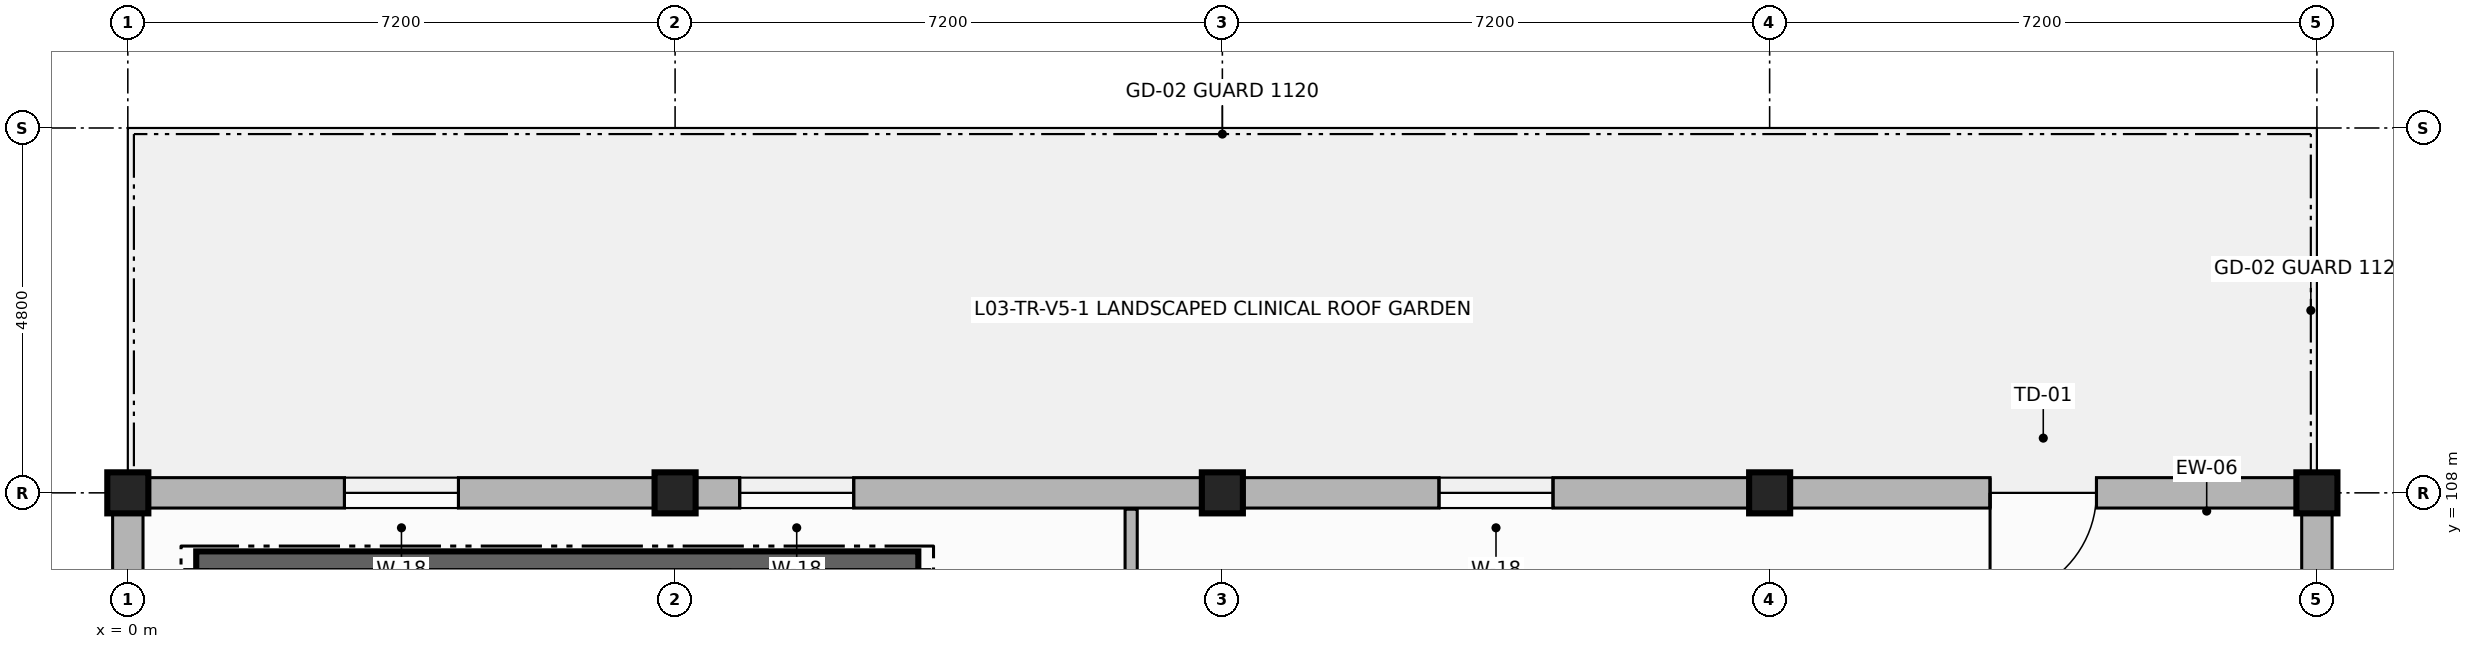
"""IFC4 building model, lengths in metres.
Left out: names, types, materials, properties, quantities, classifications, styles, units other than length and angle.
Written with IfcOpenShell. Run it as: python <this file> out.ifc"""

import sys

from ifc_helpers import new_model, si_unit, direction, frame, frame_2d, origin, origin_2d, place, context, subcontext, project, spatial, rectangle, extrude, element, fill, save


model = new_model("IFC4")
c1 = context("Model", 3, precision=1e-05, world=origin(), true_north=direction((0.0, 1.0)))
c2 = subcontext(c1, "Body", "Model", "MODEL_VIEW")
j1 = project(units=[si_unit("LENGTHUNIT", "METRE"), si_unit("PLANEANGLEUNIT", "RADIAN")], contexts=[c1])
p1 = place(None, origin())
s1 = spatial("IfcSite", under=j1, at=p1, CompositionType="ELEMENT")
p2 = place(p1, origin())
s2 = spatial("IfcBuilding", under=s1, at=p2, CompositionType="ELEMENT")
p3 = place(p2, frame((0.0, 0.0, 12.3)))
s3 = spatial("IfcBuildingStorey", under=s2, at=p3, CompositionType="ELEMENT", Elevation=12.3)
for number, where, z_axis, x_axis in (
    (1, (0.0, 108.0, 0.0), (0.0, 0.0, 1.0), (1.0, 0.0, 0.0)),
    (2, (7.2, 108.0, 0.0), (0.0, 0.0, 1.0), (1.0, 0.0, 0.0)),
    (3, (14.4, 108.0, 0.0), (0.0, 0.0, 1.0), (1.0, 0.0, 0.0)),
    (4, (21.6, 108.0, 0.0), (0.0, 0.0, 1.0), (1.0, 0.0, 0.0)),
    (5, (28.8, 108.0, 0.0), (0.0, 0.0, 1.0), (1.0, 0.0, 0.0)),
):
    element("IfcColumn", number, at=place(p3, frame(where, z_axis=z_axis, x_axis=x_axis)), inside=s3, PredefinedType="COLUMN", context=c2, shape_type="SweptSolid", body=[
        extrude(rectangle(XDim=0.54, YDim=0.54, at=origin_2d()), origin(), (0.0, 0.0, 1.0), 3.39),
    ])
p4 = place(p3, frame((28.8, 100.8, 0.0), z_axis=(0.0, 0.0, 1.0), x_axis=(0.0, 1.0, 0.0)))
e6 = element("IfcWall", 6, at=p4, inside=s3, PredefinedType="SOLIDWALL", context=c2, shape_type="SweptSolid", body=[
    extrude(rectangle(XDim=7.2, YDim=0.4, at=frame_2d((3.6, 0.0))), origin(), (0.0, 0.0, 1.0), 2.72),
])
p5 = place(p4, frame((2.85, 0.0, 0.9)))
e7 = element("IfcOpeningElement", 7, at=p5, cuts=e6, PredefinedType="OPENING", context=c2, shape_type="SweptSolid", body=[
    extrude(rectangle(XDim=1.5, YDim=1.6, at=frame_2d((0.75, 0.8))), frame((0.0, 0.21, 0.0), z_axis=(0.0, -1.0, 0.0), x_axis=(1.0, 0.0, 0.0)), (0.0, 0.0, 1.0), 0.42),
])
p6 = place(p3, frame((28.8, 108.0, 0.0), z_axis=(0.0, 0.0, 1.0), x_axis=(-1.0, 0.0, 0.0)))
e8 = element("IfcWall", 8, at=p6, inside=s3, PredefinedType="SOLIDWALL", context=c2, shape_type="SweptSolid", body=[
    extrude(rectangle(XDim=7.2, YDim=0.4, at=frame_2d((3.6, 0.0))), origin(), (0.0, 0.0, 1.0), 2.72),
])
p7 = place(p6, frame((2.9, 0.0, 0.0)))
e9 = element("IfcOpeningElement", 9, at=p7, cuts=e8, PredefinedType="OPENING", context=c2, shape_type="SweptSolid", body=[
    extrude(rectangle(XDim=1.4, YDim=2.25, at=frame_2d((0.7, 1.125))), frame((0.0, 0.21, 0.0), z_axis=(0.0, -1.0, 0.0), x_axis=(1.0, 0.0, 0.0)), (0.0, 0.0, 1.0), 0.42),
])
p8 = place(p3, frame((21.6, 108.0, 0.0), z_axis=(0.0, 0.0, 1.0), x_axis=(-1.0, 0.0, 0.0)))
e10 = element("IfcWall", 10, at=p8, inside=s3, PredefinedType="SOLIDWALL", context=c2, shape_type="SweptSolid", body=[
    extrude(rectangle(XDim=7.2, YDim=0.4, at=frame_2d((3.6, 0.0))), origin(), (0.0, 0.0, 1.0), 2.72),
])
p9 = place(p8, frame((2.85, 0.0, 0.9)))
e11 = element("IfcOpeningElement", 11, at=p9, cuts=e10, PredefinedType="OPENING", context=c2, shape_type="SweptSolid", body=[
    extrude(rectangle(XDim=1.5, YDim=1.6, at=frame_2d((0.75, 0.8))), frame((0.0, 0.21, 0.0), z_axis=(0.0, -1.0, 0.0), x_axis=(1.0, 0.0, 0.0)), (0.0, 0.0, 1.0), 0.42),
])
p10 = place(p3, frame((14.4, 108.0, 0.0), z_axis=(0.0, 0.0, 1.0), x_axis=(-1.0, 0.0, 0.0)))
e12 = element("IfcWall", 12, at=p10, inside=s3, PredefinedType="SOLIDWALL", context=c2, shape_type="SweptSolid", body=[
    extrude(rectangle(XDim=7.2, YDim=0.4, at=frame_2d((3.6, 0.0))), origin(), (0.0, 0.0, 1.0), 2.72),
])
p11 = place(p10, frame((4.85, 0.0, 0.9)))
e13 = element("IfcOpeningElement", 13, at=p11, cuts=e12, PredefinedType="OPENING", context=c2, shape_type="SweptSolid", body=[
    extrude(rectangle(XDim=1.5, YDim=1.6, at=frame_2d((0.75, 0.8))), frame((0.0, 0.21, 0.0), z_axis=(0.0, -1.0, 0.0), x_axis=(1.0, 0.0, 0.0)), (0.0, 0.0, 1.0), 0.42),
])
p12 = place(p3, frame((7.2, 108.0, 0.0), z_axis=(0.0, 0.0, 1.0), x_axis=(-1.0, 0.0, 0.0)))
e14 = element("IfcWall", 14, at=p12, inside=s3, PredefinedType="SOLIDWALL", context=c2, shape_type="SweptSolid", body=[
    extrude(rectangle(XDim=7.2, YDim=0.4, at=frame_2d((3.6, 0.0))), origin(), (0.0, 0.0, 1.0), 2.72),
])
p13 = place(p12, frame((2.85, 0.0, 0.9)))
e15 = element("IfcOpeningElement", 15, at=p13, cuts=e14, PredefinedType="OPENING", context=c2, shape_type="SweptSolid", body=[
    extrude(rectangle(XDim=1.5, YDim=1.6, at=frame_2d((0.75, 0.8))), frame((0.0, 0.21, 0.0), z_axis=(0.0, -1.0, 0.0), x_axis=(1.0, 0.0, 0.0)), (0.0, 0.0, 1.0), 0.42),
])
p14 = place(p3, frame((0.0, 108.0, 0.0), z_axis=(0.0, 0.0, 1.0), x_axis=(0.0, -1.0, 0.0)))
e16 = element("IfcWall", 16, at=p14, inside=s3, PredefinedType="SOLIDWALL", context=c2, shape_type="SweptSolid", body=[
    extrude(rectangle(XDim=7.2, YDim=0.4, at=frame_2d((3.6, 0.0))), origin(), (0.0, 0.0, 1.0), 2.72),
])
p15 = place(p14, frame((2.6, 0.0, 0.9)))
e17 = element("IfcOpeningElement", 17, at=p15, cuts=e16, PredefinedType="OPENING", context=c2, shape_type="SweptSolid", body=[
    extrude(rectangle(XDim=1.5, YDim=1.6, at=frame_2d((0.75, 0.8))), frame((0.0, 0.21, 0.0), z_axis=(0.0, -1.0, 0.0), x_axis=(1.0, 0.0, 0.0)), (0.0, 0.0, 1.0), 0.42),
])
p16 = place(p3, frame((10.4, 107.1, 0.0), z_axis=(0.0, 0.0, 1.0), x_axis=(-1.0, 0.0, 0.0)))
e18 = element("IfcWall", 18, at=p16, inside=s3, PredefinedType="SHEAR", context=c2, shape_type="SweptSolid", body=[
    extrude(rectangle(XDim=9.5, YDim=0.26, at=frame_2d((4.75, 0.0))), origin(), (0.0, 0.0, 1.0), 3.39),
])
p17 = place(p3, frame((13.2, 105.479, 0.0), z_axis=(0.0, 0.0, 1.0), x_axis=(0.0, 1.0, 0.0)))
e19 = element("IfcWall", 19, at=p17, inside=s3, PredefinedType="PARTITIONING", context=c2, shape_type="SweptSolid", body=[
    extrude(rectangle(XDim=2.306, YDim=0.16, at=frame_2d((1.153, 0.0))), origin(), (0.0, 0.0, 1.0), 2.7),
])
p18 = place(p17, frame((0.48, 0.0, 0.0)))
e20 = element("IfcOpeningElement", 20, at=p18, cuts=e19, PredefinedType="OPENING", context=c2, shape_type="SweptSolid", body=[
    extrude(rectangle(XDim=0.98, YDim=2.15, at=frame_2d((0.49, 1.075))), frame((0.0, 0.09, 0.0), z_axis=(0.0, -1.0, 0.0), x_axis=(1.0, 0.0, 0.0)), (0.0, 0.0, 1.0), 0.18),
])
p19 = place(p7, origin())
e21 = element("IfcDoor", 21, at=p19, inside=s3, OperationType="SINGLE_SWING_RIGHT", PredefinedType="DOOR", context=c2, shape_type="SweptSolid", body=[
    extrude(rectangle(XDim=1.4, YDim=2.25, at=frame_2d((0.7, 1.125))), frame((0.0, 0.025, 0.0), z_axis=(0.0, -1.0, 0.0), x_axis=(1.0, 0.0, 0.0)), (0.0, 0.0, 1.0), 0.05),
])
fill(e9, e21)
p20 = place(p9, origin())
e22 = element("IfcWindow", 22, at=p20, inside=s3, PartitioningType="SINGLE_PANEL", PredefinedType="WINDOW", context=c2, shape_type="SweptSolid", body=[
    extrude(rectangle(XDim=1.5, YDim=1.6, at=frame_2d((0.75, 0.8))), frame((0.0, 0.03, 0.0), z_axis=(0.0, -1.0, 0.0), x_axis=(1.0, 0.0, 0.0)), (0.0, 0.0, 1.0), 0.06),
])
fill(e11, e22)
p21 = place(p11, origin())
e23 = element("IfcWindow", 23, at=p21, inside=s3, PartitioningType="SINGLE_PANEL", PredefinedType="WINDOW", context=c2, shape_type="SweptSolid", body=[
    extrude(rectangle(XDim=1.5, YDim=1.6, at=frame_2d((0.75, 0.8))), frame((0.0, 0.03, 0.0), z_axis=(0.0, -1.0, 0.0), x_axis=(1.0, 0.0, 0.0)), (0.0, 0.0, 1.0), 0.06),
])
fill(e13, e23)
p22 = place(p13, origin())
e24 = element("IfcWindow", 24, at=p22, inside=s3, PartitioningType="SINGLE_PANEL", PredefinedType="WINDOW", context=c2, shape_type="SweptSolid", body=[
    extrude(rectangle(XDim=1.5, YDim=1.6, at=frame_2d((0.75, 0.8))), frame((0.0, 0.03, 0.0), z_axis=(0.0, -1.0, 0.0), x_axis=(1.0, 0.0, 0.0)), (0.0, 0.0, 1.0), 0.06),
])
fill(e15, e24)
save(model, sys.argv[1])
